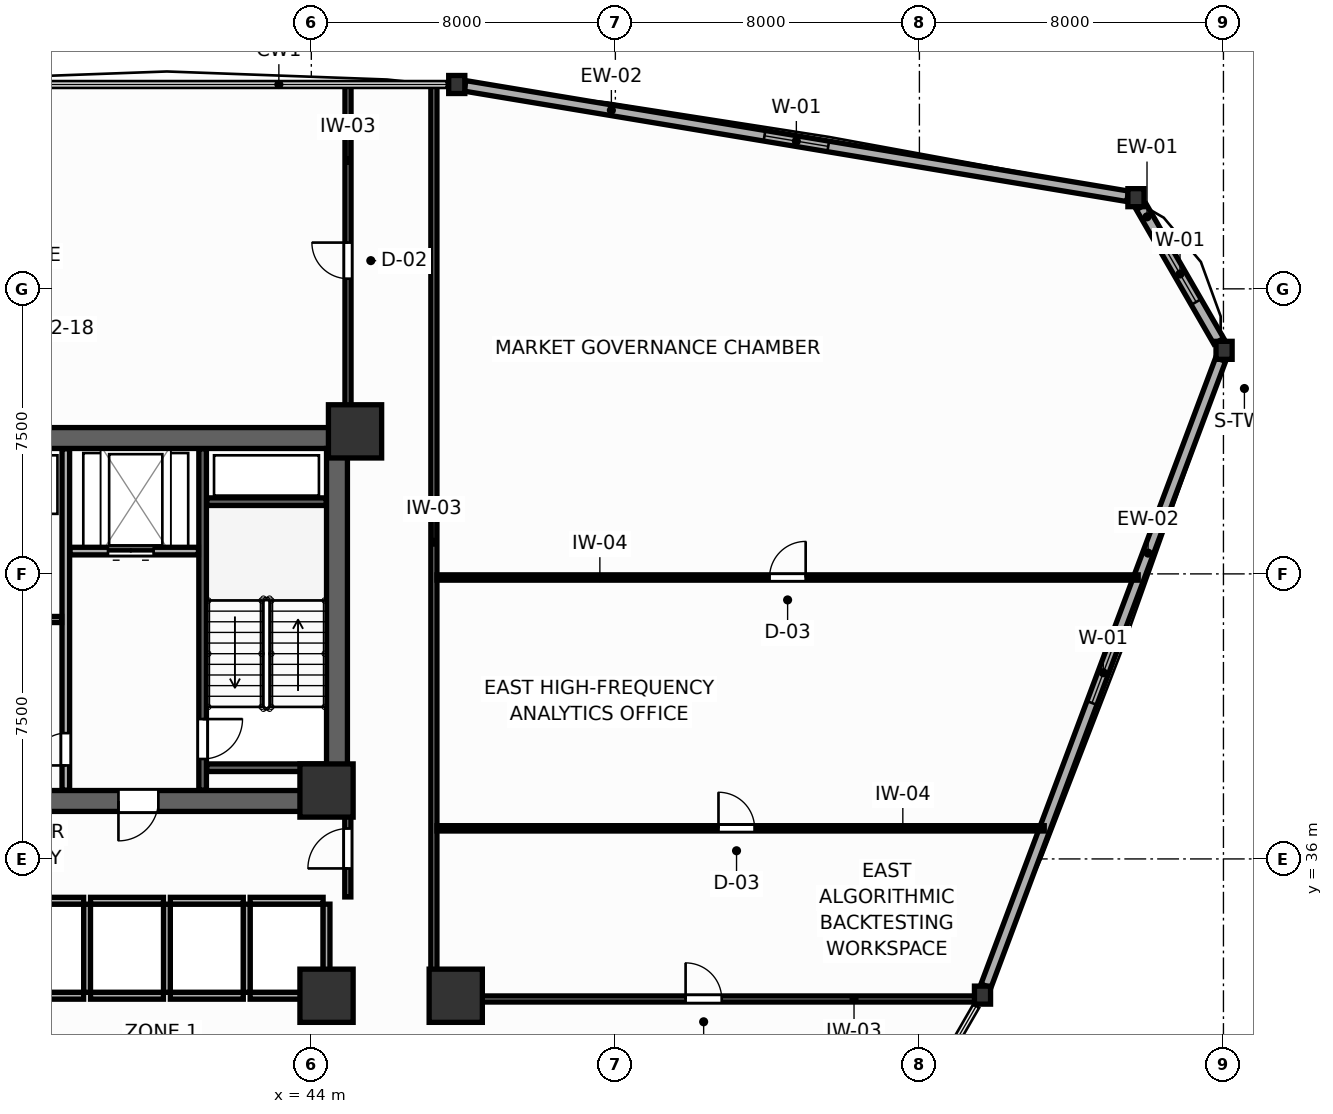
"""IFC4 building model, lengths in metres.
Left out: names, types, materials, properties, quantities, classifications, styles, units other than length and angle.
Written with IfcOpenShell. Run it as: python <this file> out.ifc"""

import sys

from ifc_helpers import new_model, si_unit, direction, frame, frame_2d, origin, origin_2d, place, context, subcontext, project, spatial, rectangle, i_section, extrude, source, transform, mapped, element, fill, save


model = new_model("IFC4")
c1 = context("Model", 3, precision=1e-05, world=origin(), true_north=direction((0.0, 1.0)))
c2 = subcontext(c1, "Body", "Model", "MODEL_VIEW")
j1 = project(units=[si_unit("LENGTHUNIT", "METRE"), si_unit("PLANEANGLEUNIT", "RADIAN")], contexts=[c1])
p1 = place(None, origin())
s1 = spatial("IfcSite", under=j1, at=p1, CompositionType="ELEMENT")
p2 = place(p1, origin())
s2 = spatial("IfcBuilding", under=s1, at=p2, CompositionType="ELEMENT")
p3 = place(p2, frame((0.0, 0.0, 67.8)))
s3 = spatial("IfcBuildingStorey", under=s2, at=p3, CompositionType="ELEMENT", Elevation=67.8)
p4 = place(p3, frame((27.05, 47.075, 0.0), z_axis=(0.0, 0.0, 1.0), x_axis=(1.0, 0.0, 0.0)))
e1 = element("IfcWall", 1, at=p4, inside=s3, PredefinedType="SHEAR", context=c2, shape_type="SweptSolid", body=[
    extrude(rectangle(XDim=17.9, YDim=0.55, at=frame_2d((8.95, 0.0))), origin(), (0.0, 0.0, 1.0), 3.9),
])
p5 = place(p3, frame((27.05, 37.525, 0.0), z_axis=(0.0, 0.0, 1.0), x_axis=(1.0, 0.0, 0.0)))
e2 = element("IfcWall", 2, at=p5, inside=s3, PredefinedType="SHEAR", context=c2, shape_type="SweptSolid", body=[
    extrude(rectangle(XDim=17.9, YDim=0.55, at=frame_2d((8.95, 0.0))), origin(), (0.0, 0.0, 1.0), 3.9),
])
p6 = place(p5, frame((4.975, 0.0, 0.0)))
e3 = element("IfcOpeningElement", 3, at=p6, cuts=e2, PredefinedType="OPENING", context=c2, shape_type="SweptSolid", body=[
    extrude(rectangle(XDim=1.05, YDim=2.1, at=frame_2d((0.525, 1.05))), frame((0.0, 0.285, 0.0), z_axis=(0.0, -1.0, 0.0), x_axis=(1.0, 0.0, 0.0)), (0.0, 0.0, 1.0), 0.57),
])
p7 = place(p5, frame((11.875, 0.0, 0.0)))
e4 = element("IfcOpeningElement", 4, at=p7, cuts=e2, PredefinedType="OPENING", context=c2, shape_type="SweptSolid", body=[
    extrude(rectangle(XDim=1.05, YDim=2.1, at=frame_2d((0.525, 1.05))), frame((0.0, 0.285, 0.0), z_axis=(0.0, -1.0, 0.0), x_axis=(1.0, 0.0, 0.0)), (0.0, 0.0, 1.0), 0.57),
])
p8 = place(p3, frame((44.675, 37.8, 0.0), z_axis=(0.0, 0.0, 1.0), x_axis=(0.0, 1.0, 0.0)))
e5 = element("IfcWall", 5, at=p8, inside=s3, PredefinedType="SHEAR", context=c2, shape_type="SweptSolid", body=[
    extrude(rectangle(XDim=9.0, YDim=0.55, at=frame_2d((4.5, 0.0))), origin(), (0.0, 0.0, 1.0), 3.9),
])
m1 = source(origin(), c2, "Body", "SweptSolid", [
    extrude(rectangle(XDim=1.4, YDim=1.4, at=origin_2d()), origin(), (0.0, 0.0, 1.0), 3.9),
])
for number, where, z_axis, x_axis in (
    (6, (45.15, 47.25, 0.0), (0.0, 0.0, 1.0), (1.0, 0.0, 0.0)),
    (7, (44.4, 37.8, 0.0), (0.0, 0.0, 1.0), (1.0, 0.0, 0.0)),
    (8, (44.4, 32.4, 0.0), (0.0, 0.0, 1.0), (1.0, 0.0, 0.0)),
    (9, (47.8, 32.4, 0.0), (0.0, 0.0, 1.0), (1.0, 0.0, 0.0)),
):
    element("IfcColumn", number, at=place(p3, frame(where, z_axis=z_axis, x_axis=x_axis)), inside=s3, PredefinedType="COLUMN", context=c2, shape_type="MappedRepresentation", body=[
        mapped(m1, transform((0.0, 0.0, 0.0), scale=1.0)),
    ])
m2 = source(origin(), c2, "Body", "SweptSolid", [
    extrude(i_section(OverallWidth=0.424, OverallDepth=0.474, WebThickness=0.045, FlangeThickness=0.072, FilletRadius=0.015, at=origin_2d()), origin(), (0.0, 0.0, 1.0), 3.9),
])
for number, where, z_axis, x_axis in (
    (10, (68.017, 49.382, 0.0), (0.0, 0.0, 1.0), (1.0, 0.0, 0.0)),
    (11, (65.698, 53.399, 0.0), (0.0, 0.0, 1.0), (1.0, 0.0, 0.0)),
    (12, (47.827, 56.377, 0.0), (0.0, 0.0, 1.0), (1.0, 0.0, 0.0)),
    (13, (61.66, 32.417, 0.0), (0.0, 0.0, 1.0), (1.0, 0.0, 0.0)),
):
    element("IfcColumn", number, at=place(p3, frame(where, z_axis=z_axis, x_axis=x_axis)), inside=s3, PredefinedType="COLUMN", context=c2, shape_type="MappedRepresentation", body=[
        mapped(m2, transform((0.0, 0.0, 0.0), scale=1.0)),
    ])
p9 = place(p3, frame((67.877, 49.624, 0.0), z_axis=(0.0, 0.0, 1.0), x_axis=(-0.500014317814, 0.866017137233, 0.0)))
e14 = element("IfcWall", 14, at=p9, inside=s3, PredefinedType="SOLIDWALL", context=c2, shape_type="SweptSolid", body=[
    extrude(rectangle(XDim=4.079, YDim=0.3, at=frame_2d((2.04, 0.0))), origin(), (0.0, 0.0, 1.0), 3.23),
])
p10 = place(p9, frame((1.189, 0.0, 0.75)))
e15 = element("IfcOpeningElement", 15, at=p10, cuts=e14, PredefinedType="OPENING", context=c2, shape_type="SweptSolid", body=[
    extrude(rectangle(XDim=1.7, YDim=1.75, at=frame_2d((0.85, 0.875))), frame((0.0, 0.16, 0.0), z_axis=(0.0, -1.0, 0.0), x_axis=(1.0, 0.0, 0.0)), (0.0, 0.0, 1.0), 0.32),
])
p11 = place(p3, frame((65.481, 53.435, 0.0), z_axis=(0.0, 0.0, 1.0), x_axis=(-0.986399895449, 0.16436315359, 0.0)))
e16 = element("IfcWall", 16, at=p11, inside=s3, PredefinedType="SOLIDWALL", context=c2, shape_type="SweptSolid", body=[
    extrude(rectangle(XDim=17.677, YDim=0.28, at=frame_2d((8.839, 0.0))), origin(), (0.0, 0.0, 1.0), 3.23),
])
p12 = place(p11, frame((7.989, 0.0, 0.75)))
e17 = element("IfcOpeningElement", 17, at=p12, cuts=e16, PredefinedType="OPENING", context=c2, shape_type="SweptSolid", body=[
    extrude(rectangle(XDim=1.7, YDim=1.75, at=frame_2d((0.85, 0.875))), frame((0.0, 0.15, 0.0), z_axis=(0.0, -1.0, 0.0), x_axis=(1.0, 0.0, 0.0)), (0.0, 0.0, 1.0), 0.3),
])
p13 = place(p3, frame((61.751, 32.658, 0.0), z_axis=(0.0, 0.0, 1.0), x_axis=(0.350833077365, 0.936438012805, 0.0)))
e18 = element("IfcWall", 18, at=p13, inside=s3, PredefinedType="SOLIDWALL", context=c2, shape_type="SweptSolid", body=[
    extrude(rectangle(XDim=17.6, YDim=0.28, at=frame_2d((8.8, 0.0))), origin(), (0.0, 0.0, 1.0), 3.23),
])
p14 = place(p13, frame((7.95, 0.0, 0.75)))
e19 = element("IfcOpeningElement", 19, at=p14, cuts=e18, PredefinedType="OPENING", context=c2, shape_type="SweptSolid", body=[
    extrude(rectangle(XDim=1.7, YDim=1.75, at=frame_2d((0.85, 0.875))), frame((0.0, 0.15, 0.0), z_axis=(0.0, -1.0, 0.0), x_axis=(1.0, 0.0, 0.0)), (0.0, 0.0, 1.0), 0.3),
])
p15 = place(p3, frame((41.14, 37.81, 0.0), z_axis=(0.0, 0.0, 1.0), x_axis=(0.0, 1.0, 0.0)))
e20 = element("IfcWall", 20, at=p15, inside=s3, PredefinedType="SHEAR", context=c2, shape_type="SweptSolid", body=[
    extrude(rectangle(XDim=8.98, YDim=0.2, at=frame_2d((4.49, 0.0))), origin(), (0.0, 0.0, 1.0), 3.9),
])
p16 = place(p15, frame((0.82, 0.0, 0.0)))
e21 = element("IfcOpeningElement", 21, at=p16, cuts=e20, PredefinedType="OPENING", context=c2, shape_type="SweptSolid", body=[
    extrude(rectangle(XDim=1.05, YDim=2.1, at=frame_2d((0.525, 1.05))), frame((0.0, 0.11, 0.0), z_axis=(0.0, -1.0, 0.0), x_axis=(1.0, 0.0, 0.0)), (0.0, 0.0, 1.0), 0.22),
])
for number, where, z_axis, x_axis in (
    (22, (41.25, 45.4, 0.0), (0.0, 0.0, 1.0), (1.0, 0.0, 0.0)),
    (23, (41.25, 38.4, 0.0), (0.0, 0.0, 1.0), (1.0, 0.0, 0.0)),
):
    element("IfcWall", number, at=place(p3, frame(where, z_axis=z_axis, x_axis=x_axis)), inside=s3, PredefinedType="SHEAR", context=c2, shape_type="SweptSolid", body=[
        extrude(rectangle(XDim=3.14, YDim=0.2, at=frame_2d((1.57, 0.0))), origin(), (0.0, 0.0, 1.0), 3.9),
    ])
p17 = place(p3, frame((37.65, 44.1, 0.0), z_axis=(0.0, 0.0, 1.0), x_axis=(1.0, 0.0, 0.0)))
e24 = element("IfcWall", 24, at=p17, inside=s3, PredefinedType="PARTITIONING", context=c2, shape_type="SweptSolid", body=[
    extrude(rectangle(XDim=3.38, YDim=0.2, at=frame_2d((1.69, 0.0))), origin(), (0.0, 0.0, 1.0), 3.68),
])
p18 = place(p17, frame((1.0, 0.0, 0.0)))
e25 = element("IfcOpeningElement", 25, at=p18, cuts=e24, PredefinedType="OPENING", context=c2, shape_type="SweptSolid", body=[
    extrude(rectangle(XDim=1.2, YDim=2.1, at=frame_2d((0.6, 1.05))), frame((0.0, 0.11, 0.0), z_axis=(0.0, -1.0, 0.0), x_axis=(1.0, 0.0, 0.0)), (0.0, 0.0, 1.0), 0.22),
])
p19 = place(p3, frame((37.54, 37.81, 0.0), z_axis=(0.0, 0.0, 1.0), x_axis=(0.0, 1.0, 0.0)))
e26 = element("IfcWall", 26, at=p19, inside=s3, PredefinedType="PARTITIONING", context=c2, shape_type="SweptSolid", body=[
    extrude(rectangle(XDim=8.98, YDim=0.2, at=frame_2d((4.49, 0.0))), origin(), (0.0, 0.0, 1.0), 3.68),
])
p20 = place(p19, frame((0.65, 0.0, 0.0)))
e27 = element("IfcOpeningElement", 27, at=p20, cuts=e26, PredefinedType="OPENING", context=c2, shape_type="SweptSolid", body=[
    extrude(rectangle(XDim=0.85, YDim=2.05, at=frame_2d((0.425, 1.025))), frame((0.0, 0.11, 0.0), z_axis=(0.0, -1.0, 0.0), x_axis=(1.0, 0.0, 0.0)), (0.0, 0.0, 1.0), 0.22),
])
p21 = place(p3, frame((34.57, 42.3, 0.0), z_axis=(0.0, 0.0, 1.0), x_axis=(1.0, 0.0, 0.0)))
e28 = element("IfcWall", 28, at=p21, inside=s3, PredefinedType="PARTITIONING", context=c2, shape_type="SweptSolid", body=[
    extrude(rectangle(XDim=2.86, YDim=0.16, at=frame_2d((1.43, 0.0))), origin(), (0.0, 0.0, 1.0), 3.68),
])
p22 = place(p3, frame((36.09, 34.9, 0.0), z_axis=(0.0, 0.0, 1.0), x_axis=(1.0, 0.0, 0.0)))
e29 = element("IfcWall", 29, at=p22, inside=s3, PredefinedType="PARTITIONING", context=c2, shape_type="SweptSolid", body=[
    extrude(rectangle(XDim=1.92, YDim=0.18, at=frame_2d((0.96, 0.0))), origin(), (0.0, 0.0, 1.0), 3.68),
])
p23 = place(p3, frame((36.09, 32.4, 0.0), z_axis=(0.0, 0.0, 1.0), x_axis=(1.0, 0.0, 0.0)))
e30 = element("IfcWall", 30, at=p23, inside=s3, PredefinedType="PARTITIONING", context=c2, shape_type="SweptSolid", body=[
    extrude(rectangle(XDim=1.92, YDim=0.18, at=frame_2d((0.96, 0.0))), origin(), (0.0, 0.0, 1.0), 3.18),
])
p24 = place(p3, frame((38.19, 34.9, 0.0), z_axis=(0.0, 0.0, 1.0), x_axis=(1.0, 0.0, 0.0)))
e31 = element("IfcWall", 31, at=p24, inside=s3, PredefinedType="PARTITIONING", context=c2, shape_type="SweptSolid", body=[
    extrude(rectangle(XDim=1.92, YDim=0.18, at=frame_2d((0.96, 0.0))), origin(), (0.0, 0.0, 1.0), 3.68),
])
p25 = place(p3, frame((38.19, 32.4, 0.0), z_axis=(0.0, 0.0, 1.0), x_axis=(1.0, 0.0, 0.0)))
e32 = element("IfcWall", 32, at=p25, inside=s3, PredefinedType="PARTITIONING", context=c2, shape_type="SweptSolid", body=[
    extrude(rectangle(XDim=1.92, YDim=0.18, at=frame_2d((0.96, 0.0))), origin(), (0.0, 0.0, 1.0), 3.18),
])
p26 = place(p3, frame((38.1, 32.49, 0.0), z_axis=(0.0, 0.0, 1.0), x_axis=(0.0, 1.0, 0.0)))
e33 = element("IfcWall", 33, at=p26, inside=s3, PredefinedType="PARTITIONING", context=c2, shape_type="SweptSolid", body=[
    extrude(rectangle(XDim=2.32, YDim=0.18, at=frame_2d((1.16, 0.0))), origin(), (0.0, 0.0, 1.0), 3.68),
])
p27 = place(p3, frame((40.29, 34.9, 0.0), z_axis=(0.0, 0.0, 1.0), x_axis=(1.0, 0.0, 0.0)))
e34 = element("IfcWall", 34, at=p27, inside=s3, PredefinedType="PARTITIONING", context=c2, shape_type="SweptSolid", body=[
    extrude(rectangle(XDim=1.92, YDim=0.18, at=frame_2d((0.96, 0.0))), origin(), (0.0, 0.0, 1.0), 3.68),
])
p28 = place(p3, frame((40.29, 32.4, 0.0), z_axis=(0.0, 0.0, 1.0), x_axis=(1.0, 0.0, 0.0)))
e35 = element("IfcWall", 35, at=p28, inside=s3, PredefinedType="PARTITIONING", context=c2, shape_type="SweptSolid", body=[
    extrude(rectangle(XDim=1.92, YDim=0.18, at=frame_2d((0.96, 0.0))), origin(), (0.0, 0.0, 1.0), 3.18),
])
p29 = place(p3, frame((40.2, 32.49, 0.0), z_axis=(0.0, 0.0, 1.0), x_axis=(0.0, 1.0, 0.0)))
e36 = element("IfcWall", 36, at=p29, inside=s3, PredefinedType="PARTITIONING", context=c2, shape_type="SweptSolid", body=[
    extrude(rectangle(XDim=2.32, YDim=0.18, at=frame_2d((1.16, 0.0))), origin(), (0.0, 0.0, 1.0), 3.68),
])
p30 = place(p3, frame((42.39, 34.9, 0.0), z_axis=(0.0, 0.0, 1.0), x_axis=(1.0, 0.0, 0.0)))
e37 = element("IfcWall", 37, at=p30, inside=s3, PredefinedType="PARTITIONING", context=c2, shape_type="SweptSolid", body=[
    extrude(rectangle(XDim=1.92, YDim=0.18, at=frame_2d((0.96, 0.0))), origin(), (0.0, 0.0, 1.0), 3.68),
])
p31 = place(p3, frame((42.39, 32.4, 0.0), z_axis=(0.0, 0.0, 1.0), x_axis=(1.0, 0.0, 0.0)))
e38 = element("IfcWall", 38, at=p31, inside=s3, PredefinedType="PARTITIONING", context=c2, shape_type="SweptSolid", body=[
    extrude(rectangle(XDim=1.92, YDim=0.18, at=frame_2d((0.96, 0.0))), origin(), (0.0, 0.0, 1.0), 3.18),
])
for number, where, z_axis, x_axis in (
    (39, (42.3, 32.49, 0.0), (0.0, 0.0, 1.0), (0.0, 1.0, 0.0)),
    (40, (44.4, 32.49, 0.0), (0.0, 0.0, 1.0), (0.0, 1.0, 0.0)),
):
    element("IfcWall", number, at=place(p3, frame(where, z_axis=z_axis, x_axis=x_axis)), inside=s3, PredefinedType="PARTITIONING", context=c2, shape_type="SweptSolid", body=[
        extrude(rectangle(XDim=2.32, YDim=0.18, at=frame_2d((1.16, 0.0))), origin(), (0.0, 0.0, 1.0), 3.68),
    ])
p32 = place(p3, frame((44.96, 35.0, 0.0), z_axis=(0.0, 0.0, 1.0), x_axis=(0.0, 1.0, 0.0)))
e41 = element("IfcWall", 41, at=p32, inside=s3, PredefinedType="PARTITIONING", context=c2, shape_type="SweptSolid", body=[
    extrude(rectangle(XDim=2.65, YDim=0.16, at=frame_2d((1.325, 0.0))), origin(), (0.0, 0.0, 1.0), 3.68),
])
p33 = place(p32, frame((0.75, 0.0, 0.0)))
e42 = element("IfcOpeningElement", 42, at=p33, cuts=e41, PredefinedType="OPENING", context=c2, shape_type="SweptSolid", body=[
    extrude(rectangle(XDim=1.05, YDim=2.1, at=frame_2d((0.525, 1.05))), frame((0.0, 0.09, 0.0), z_axis=(0.0, -1.0, 0.0), x_axis=(1.0, 0.0, 0.0)), (0.0, 0.0, 1.0), 0.18),
])
p34 = place(p3, frame((47.225, 32.31, 0.0), z_axis=(0.0, 0.0, 1.0), x_axis=(0.0, 1.0, 0.0)))
e43 = element("IfcWall", 43, at=p34, inside=s3, PredefinedType="PARTITIONING", context=c2, shape_type="SweptSolid", body=[
    extrude(rectangle(XDim=24.047, YDim=0.16, at=frame_2d((12.023, 0.0))), origin(), (0.0, 0.0, 1.0), 3.18),
])
p35 = place(p3, frame((47.307, 32.315, 0.0), z_axis=(0.0, 0.0, 1.0), x_axis=(1.0, 0.0, 0.0)))
e44 = element("IfcWall", 44, at=p35, inside=s3, PredefinedType="PARTITIONING", context=c2, shape_type="SweptSolid", body=[
    extrude(rectangle(XDim=14.275, YDim=0.16, at=frame_2d((7.137, 0.0))), origin(), (0.0, 0.0, 1.0), 3.18),
])
p36 = place(p35, frame((6.541, 0.0, 0.0)))
e45 = element("IfcOpeningElement", 45, at=p36, cuts=e44, PredefinedType="OPENING", context=c2, shape_type="SweptSolid", body=[
    extrude(rectangle(XDim=0.95, YDim=2.05, at=frame_2d((0.475, 1.025))), frame((0.0, 0.09, 0.0), z_axis=(0.0, -1.0, 0.0), x_axis=(1.0, 0.0, 0.0)), (0.0, 0.0, 1.0), 0.18),
])
p37 = place(p3, frame((44.965, 47.34, 0.0), z_axis=(0.0, 0.0, 1.0), x_axis=(0.0, 1.0, 0.0)))
e46 = element("IfcWall", 46, at=p37, inside=s3, PredefinedType="PARTITIONING", context=c2, shape_type="SweptSolid", body=[
    extrude(rectangle(XDim=9.017, YDim=0.16, at=frame_2d((4.508, 0.0))), origin(), (0.0, 0.0, 1.0), 3.68),
])
p38 = place(p37, frame((3.927, 0.0, 0.0)))
e47 = element("IfcOpeningElement", 47, at=p38, cuts=e46, PredefinedType="OPENING", context=c2, shape_type="SweptSolid", body=[
    extrude(rectangle(XDim=0.95, YDim=2.05, at=frame_2d((0.475, 1.025))), frame((0.0, 0.09, 0.0), z_axis=(0.0, -1.0, 0.0), x_axis=(1.0, 0.0, 0.0)), (0.0, 0.0, 1.0), 0.18),
])
p39 = place(p3, frame((47.307, 43.405, 0.0), z_axis=(0.0, 0.0, 1.0), x_axis=(1.0, 0.0, 0.0)))
e48 = element("IfcWall", 48, at=p39, inside=s3, PredefinedType="PARTITIONING", context=c2, shape_type="SweptSolid", body=[
    extrude(rectangle(XDim=18.45, YDim=0.14, at=frame_2d((9.225, 0.0))), origin(), (0.0, 0.0, 1.0), 3.68),
])
p40 = place(p39, frame((8.75, 0.0, 0.0)))
e49 = element("IfcOpeningElement", 49, at=p40, cuts=e48, PredefinedType="OPENING", context=c2, shape_type="SweptSolid", body=[
    extrude(rectangle(XDim=0.95, YDim=2.05, at=frame_2d((0.475, 1.025))), frame((0.0, 0.08, 0.0), z_axis=(0.0, -1.0, 0.0), x_axis=(1.0, 0.0, 0.0)), (0.0, 0.0, 1.0), 0.16),
])
p41 = place(p3, frame((47.307, 36.805, 0.0), z_axis=(0.0, 0.0, 1.0), x_axis=(1.0, 0.0, 0.0)))
e50 = element("IfcWall", 50, at=p41, inside=s3, PredefinedType="PARTITIONING", context=c2, shape_type="SweptSolid", body=[
    extrude(rectangle(XDim=15.978, YDim=0.14, at=frame_2d((7.989, 0.0))), origin(), (0.0, 0.0, 1.0), 3.68),
])
p42 = place(p41, frame((7.406, 0.0, 0.0)))
e51 = element("IfcOpeningElement", 51, at=p42, cuts=e50, PredefinedType="OPENING", context=c2, shape_type="SweptSolid", body=[
    extrude(rectangle(XDim=0.95, YDim=2.05, at=frame_2d((0.475, 1.025))), frame((0.0, 0.08, 0.0), z_axis=(0.0, -1.0, 0.0), x_axis=(1.0, 0.0, 0.0)), (0.0, 0.0, 1.0), 0.16),
])
p43 = place(p10, origin())
e52 = element("IfcWindow", 52, at=p43, inside=s3, PartitioningType="SINGLE_PANEL", PredefinedType="WINDOW", context=c2, shape_type="SweptSolid", body=[
    extrude(rectangle(XDim=1.7, YDim=1.75, at=frame_2d((0.85, 0.875))), frame((0.0, 0.03, 0.0), z_axis=(0.0, -1.0, 0.0), x_axis=(1.0, 0.0, 0.0)), (0.0, 0.0, 1.0), 0.06),
])
fill(e15, e52)
p44 = place(p12, origin())
e53 = element("IfcWindow", 53, at=p44, inside=s3, PartitioningType="SINGLE_PANEL", PredefinedType="WINDOW", context=c2, shape_type="SweptSolid", body=[
    extrude(rectangle(XDim=1.7, YDim=1.75, at=frame_2d((0.85, 0.875))), frame((0.0, 0.03, 0.0), z_axis=(0.0, -1.0, 0.0), x_axis=(1.0, 0.0, 0.0)), (0.0, 0.0, 1.0), 0.06),
])
fill(e17, e53)
p45 = place(p14, origin())
e54 = element("IfcWindow", 54, at=p45, inside=s3, PartitioningType="SINGLE_PANEL", PredefinedType="WINDOW", context=c2, shape_type="SweptSolid", body=[
    extrude(rectangle(XDim=1.7, YDim=1.75, at=frame_2d((0.85, 0.875))), frame((0.0, 0.03, 0.0), z_axis=(0.0, -1.0, 0.0), x_axis=(1.0, 0.0, 0.0)), (0.0, 0.0, 1.0), 0.06),
])
fill(e19, e54)
p46 = place(p16, frame((1.05, 0.0, 0.0), z_axis=(0.0, 0.0, 1.0), x_axis=(-1.0, 0.0, 0.0)))
e55 = element("IfcDoor", 55, at=p46, inside=s3, OperationType="SINGLE_SWING_LEFT", PredefinedType="DOOR", context=c2, shape_type="SweptSolid", body=[
    extrude(rectangle(XDim=1.05, YDim=2.1, at=frame_2d((0.525, 1.05))), frame((0.0, 0.025, 0.0), z_axis=(0.0, -1.0, 0.0), x_axis=(1.0, 0.0, 0.0)), (0.0, 0.0, 1.0), 0.05),
])
fill(e21, e55)
p47 = place(p18, origin())
e56 = element("IfcDoor", 56, at=p47, inside=s3, OperationType="DOUBLE_DOOR_SLIDING", PredefinedType="DOOR", context=c2, shape_type="SweptSolid", body=[
    extrude(rectangle(XDim=1.2, YDim=2.1, at=frame_2d((0.6, 1.05))), frame((0.0, 0.025, 0.0), z_axis=(0.0, -1.0, 0.0), x_axis=(1.0, 0.0, 0.0)), (0.0, 0.0, 1.0), 0.05),
])
fill(e25, e56)
p48 = place(p20, origin())
e57 = element("IfcDoor", 57, at=p48, inside=s3, OperationType="SINGLE_SWING_LEFT", PredefinedType="DOOR", context=c2, shape_type="SweptSolid", body=[
    extrude(rectangle(XDim=0.85, YDim=2.05, at=frame_2d((0.425, 1.025))), frame((0.0, 0.025, 0.0), z_axis=(0.0, -1.0, 0.0), x_axis=(1.0, 0.0, 0.0)), (0.0, 0.0, 1.0), 0.05),
])
fill(e27, e57)
p49 = place(p33, origin())
e58 = element("IfcDoor", 58, at=p49, inside=s3, OperationType="SINGLE_SWING_LEFT", PredefinedType="DOOR", context=c2, shape_type="SweptSolid", body=[
    extrude(rectangle(XDim=1.05, YDim=2.1, at=frame_2d((0.525, 1.05))), frame((0.0, 0.025, 0.0), z_axis=(0.0, -1.0, 0.0), x_axis=(1.0, 0.0, 0.0)), (0.0, 0.0, 1.0), 0.05),
])
fill(e42, e58)
p50 = place(p36, origin())
e59 = element("IfcDoor", 59, at=p50, inside=s3, OperationType="SINGLE_SWING_LEFT", PredefinedType="DOOR", context=c2, shape_type="SweptSolid", body=[
    extrude(rectangle(XDim=0.95, YDim=2.05, at=frame_2d((0.475, 1.025))), frame((0.0, 0.025, 0.0), z_axis=(0.0, -1.0, 0.0), x_axis=(1.0, 0.0, 0.0)), (0.0, 0.0, 1.0), 0.05),
])
fill(e45, e59)
p51 = place(p38, origin())
e60 = element("IfcDoor", 60, at=p51, inside=s3, OperationType="SINGLE_SWING_RIGHT", PredefinedType="DOOR", context=c2, shape_type="SweptSolid", body=[
    extrude(rectangle(XDim=0.95, YDim=2.05, at=frame_2d((0.475, 1.025))), frame((0.0, 0.025, 0.0), z_axis=(0.0, -1.0, 0.0), x_axis=(1.0, 0.0, 0.0)), (0.0, 0.0, 1.0), 0.05),
])
fill(e47, e60)
p52 = place(p40, origin())
e61 = element("IfcDoor", 61, at=p52, inside=s3, OperationType="SINGLE_SWING_RIGHT", PredefinedType="DOOR", context=c2, shape_type="SweptSolid", body=[
    extrude(rectangle(XDim=0.95, YDim=2.05, at=frame_2d((0.475, 1.025))), frame((0.0, 0.025, 0.0), z_axis=(0.0, -1.0, 0.0), x_axis=(1.0, 0.0, 0.0)), (0.0, 0.0, 1.0), 0.05),
])
fill(e49, e61)
p53 = place(p42, origin())
e62 = element("IfcDoor", 62, at=p53, inside=s3, OperationType="SINGLE_SWING_LEFT", PredefinedType="DOOR", context=c2, shape_type="SweptSolid", body=[
    extrude(rectangle(XDim=0.95, YDim=2.05, at=frame_2d((0.475, 1.025))), frame((0.0, 0.025, 0.0), z_axis=(0.0, -1.0, 0.0), x_axis=(1.0, 0.0, 0.0)), (0.0, 0.0, 1.0), 0.05),
])
fill(e51, e62)
p54 = place(p7, frame((1.05, 0.0, 0.0), z_axis=(0.0, 0.0, 1.0), x_axis=(-1.0, 0.0, 0.0)))
e63 = element("IfcDoor", 63, at=p54, inside=s3, OperationType="SINGLE_SWING_RIGHT", PredefinedType="DOOR", context=c2, shape_type="SweptSolid", body=[
    extrude(rectangle(XDim=1.05, YDim=2.1, at=frame_2d((0.525, 1.05))), frame((0.0, 0.025, 0.0), z_axis=(0.0, -1.0, 0.0), x_axis=(1.0, 0.0, 0.0)), (0.0, 0.0, 1.0), 0.05),
])
fill(e4, e63)
save(model, sys.argv[1])
